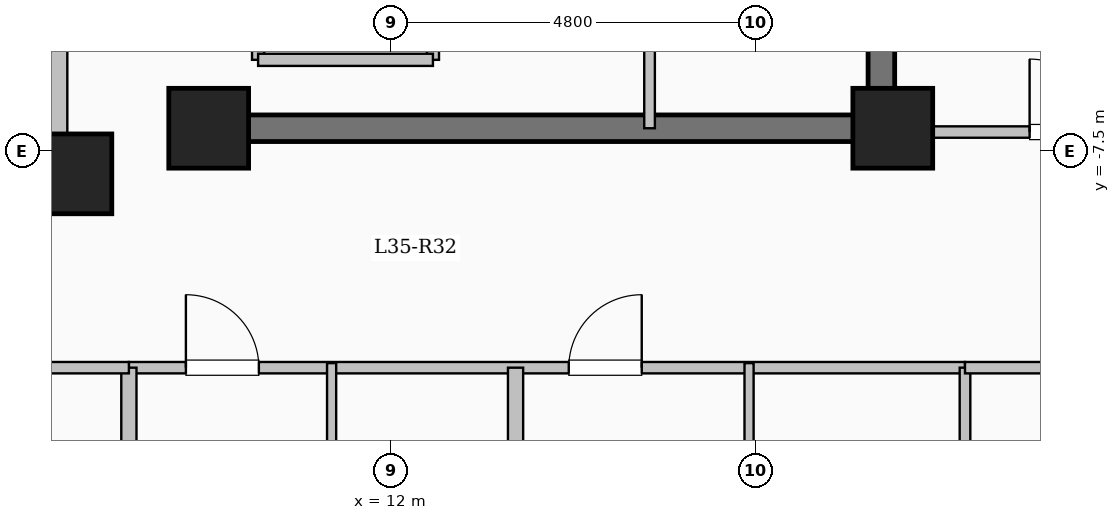
"""IFC4 building model, lengths in metres.
Left out: names, types, materials, properties, quantities, classifications, styles, units other than length and angle.
Written with IfcOpenShell. Run it as: python <this file> out.ifc"""

import sys

from ifc_helpers import new_model, si_unit, direction, frame, frame_2d, origin, origin_2d, place, context, subcontext, project, spatial, rectangle, extrude, element, fill, save


model = new_model("IFC4")
c1 = context("Model", 3, precision=1e-05, world=origin(), true_north=direction((0.0, 1.0)))
c2 = subcontext(c1, "Body", "Model", "MODEL_VIEW")
j1 = project(units=[si_unit("LENGTHUNIT", "METRE"), si_unit("PLANEANGLEUNIT", "RADIAN")], contexts=[c1])
p1 = place(None, origin())
s1 = spatial("IfcSite", under=j1, at=p1, CompositionType="ELEMENT")
p2 = place(p1, origin())
s2 = spatial("IfcBuilding", under=s1, at=p2, CompositionType="ELEMENT")
p3 = place(p2, frame((0.0, 0.0, 132.6)))
s3 = spatial("IfcBuildingStorey", under=s2, at=p3, CompositionType="ELEMENT", Elevation=132.6)
for number, where, z_axis, x_axis in (
    (1, (7.8, -7.8, 0.0), (0.0, 0.0, 1.0), (1.0, 0.0, 0.0)),
    (2, (9.6, -7.2, 0.0), (0.0, 0.0, 1.0), (1.0, 0.0, 0.0)),
    (3, (18.6, -7.2, 0.0), (0.0, 0.0, 1.0), (1.0, 0.0, 0.0)),
):
    element("IfcColumn", number, at=place(p3, frame(where, z_axis=z_axis, x_axis=x_axis)), inside=s3, PredefinedType="COLUMN", context=c2, shape_type="SweptSolid", body=[
        extrude(rectangle(XDim=1.05, YDim=1.05, at=origin_2d()), origin(), (0.0, 0.0, 1.0), 3.35),
    ])
p4 = place(p3, frame((-7.62, -7.62, 0.0), z_axis=(0.0, 0.0, 1.0), x_axis=(1.0, 0.0, 0.0)))
e4 = element("IfcWall", 4, at=p4, inside=s3, PredefinedType="SOLIDWALL", context=c2, shape_type="SweptSolid", body=[
    extrude(rectangle(XDim=15.24, YDim=0.24, at=frame_2d((7.62, 0.0))), origin(), (0.0, 0.0, 1.0), 3.1),
])
p5 = place(p4, frame((6.92, 0.0, 0.95)))
e5 = element("IfcOpeningElement", 5, at=p5, cuts=e4, PredefinedType="OPENING", context=c2, shape_type="SweptSolid", body=[
    extrude(rectangle(XDim=1.4, YDim=1.5, at=frame_2d((0.7, 0.75))), frame((0.0, 0.13, 0.0), z_axis=(0.0, -1.0, 0.0), x_axis=(1.0, 0.0, 0.0)), (0.0, 0.0, 1.0), 0.26),
])
p6 = place(p3, frame((7.62, -7.62, 0.0), z_axis=(0.0, 0.0, 1.0), x_axis=(0.0, 1.0, 0.0)))
e6 = element("IfcWall", 6, at=p6, inside=s3, PredefinedType="SOLIDWALL", context=c2, shape_type="SweptSolid", body=[
    extrude(rectangle(XDim=15.24, YDim=0.24, at=frame_2d((7.62, 0.0))), origin(), (0.0, 0.0, 1.0), 3.1),
])
p7 = place(p6, frame((6.92, 0.0, 0.95)))
e7 = element("IfcOpeningElement", 7, at=p7, cuts=e6, PredefinedType="OPENING", context=c2, shape_type="SweptSolid", body=[
    extrude(rectangle(XDim=1.4, YDim=1.5, at=frame_2d((0.7, 0.75))), frame((0.0, 0.13, 0.0), z_axis=(0.0, -1.0, 0.0), x_axis=(1.0, 0.0, 0.0)), (0.0, 0.0, 1.0), 0.26),
])
p8 = place(p3, frame((10.25, -6.3, 0.0), z_axis=(0.0, 0.0, 1.0), x_axis=(0.0, 1.0, 0.0)))
e8 = element("IfcWall", 8, at=p8, inside=s3, PredefinedType="SOLIDWALL", context=c2, shape_type="SweptSolid", body=[
    extrude(rectangle(XDim=2.6, YDim=0.16, at=frame_2d((1.3, 0.0))), origin(), (0.0, 0.0, 1.0), 3.1),
])
p9 = place(p8, frame((0.75, 0.0, 0.0)))
e9 = element("IfcOpeningElement", 9, at=p9, cuts=e8, PredefinedType="OPENING", context=c2, shape_type="SweptSolid", body=[
    extrude(rectangle(XDim=1.1, YDim=2.15, at=frame_2d((0.55, 1.075))), frame((0.0, 0.09, 0.0), z_axis=(0.0, -1.0, 0.0), x_axis=(1.0, 0.0, 0.0)), (0.0, 0.0, 1.0), 0.18),
])
p10 = place(p3, frame((12.55, -6.3, 0.0), z_axis=(0.0, 0.0, 1.0), x_axis=(0.0, 1.0, 0.0)))
e10 = element("IfcWall", 10, at=p10, inside=s3, PredefinedType="SOLIDWALL", context=c2, shape_type="SweptSolid", body=[
    extrude(rectangle(XDim=2.6, YDim=0.16, at=frame_2d((1.3, 0.0))), origin(), (0.0, 0.0, 1.0), 3.1),
])
p11 = place(p3, frame((10.25, -6.3, 0.0), z_axis=(0.0, 0.0, 1.0), x_axis=(1.0, 0.0, 0.0)))
e11 = element("IfcWall", 11, at=p11, inside=s3, PredefinedType="SOLIDWALL", context=c2, shape_type="SweptSolid", body=[
    extrude(rectangle(XDim=2.3, YDim=0.16, at=frame_2d((1.15, 0.0))), origin(), (0.0, 0.0, 1.0), 3.1),
])
p12 = place(p3, frame((18.45, -7.375, 0.0), z_axis=(0.0, 0.0, 1.0), x_axis=(0.0, 1.0, 0.0)))
e12 = element("IfcWall", 12, at=p12, inside=s3, PredefinedType="SHEAR", context=c2, shape_type="SweptSolid", body=[
    extrude(rectangle(XDim=14.05, YDim=0.35, at=frame_2d((7.025, 0.0))), origin(), (0.0, 0.0, 1.0), 3.35),
])
p13 = place(p3, frame((10.075, -7.2, 0.0), z_axis=(0.0, 0.0, 1.0), x_axis=(1.0, 0.0, 0.0)))
e13 = element("IfcWall", 13, at=p13, inside=s3, PredefinedType="SHEAR", context=c2, shape_type="SweptSolid", body=[
    extrude(rectangle(XDim=8.55, YDim=0.35, at=frame_2d((4.275, 0.0))), origin(), (0.0, 0.0, 1.0), 3.35),
])
p14 = place(p3, frame((15.4, -7.2, 0.0), z_axis=(0.0, 0.0, 1.0), x_axis=(0.0, 1.0, 0.0)))
e14 = element("IfcWall", 14, at=p14, inside=s3, PredefinedType="PARTITIONING", context=c2, shape_type="SweptSolid", body=[
    extrude(rectangle(XDim=10.45, YDim=0.14, at=frame_2d((5.225, 0.0))), origin(), (0.0, 0.0, 1.0), 3.1),
])
p15 = place(p14, frame((9.25, 0.0, 0.0)))
e15 = element("IfcOpeningElement", 15, at=p15, cuts=e14, PredefinedType="OPENING", context=c2, shape_type="SweptSolid", body=[
    extrude(rectangle(XDim=0.9, YDim=2.08, at=frame_2d((0.45, 1.04))), frame((0.0, 0.08, 0.0), z_axis=(0.0, -1.0, 0.0), x_axis=(1.0, 0.0, 0.0)), (0.0, 0.0, 1.0), 0.16),
])
p16 = place(p3, frame((8.55, -10.35, 0.0), z_axis=(0.0, 0.0, 1.0), x_axis=(1.0, 0.0, 0.0)))
e16 = element("IfcWall", 16, at=p16, inside=s3, PredefinedType="PARTITIONING", context=c2, shape_type="SweptSolid", body=[
    extrude(rectangle(XDim=11.0, YDim=0.15, at=frame_2d((5.5, 0.0))), origin(), (0.0, 0.0, 1.0), 3.1),
])
p17 = place(p16, frame((0.75, 0.0, 0.0)))
e17 = element("IfcOpeningElement", 17, at=p17, cuts=e16, PredefinedType="OPENING", context=c2, shape_type="SweptSolid", body=[
    extrude(rectangle(XDim=0.96, YDim=2.15, at=frame_2d((0.48, 1.075))), frame((0.0, 0.085, 0.0), z_axis=(0.0, -1.0, 0.0), x_axis=(1.0, 0.0, 0.0)), (0.0, 0.0, 1.0), 0.17),
])
p18 = place(p16, frame((5.787, 0.0, 0.0)))
e18 = element("IfcOpeningElement", 18, at=p18, cuts=e16, PredefinedType="OPENING", context=c2, shape_type="SweptSolid", body=[
    extrude(rectangle(XDim=0.96, YDim=2.15, at=frame_2d((0.48, 1.075))), frame((0.0, 0.085, 0.0), z_axis=(0.0, -1.0, 0.0), x_axis=(1.0, 0.0, 0.0)), (0.0, 0.0, 1.0), 0.17),
])
p19 = place(p3, frame((13.637, -21.2, 0.0), z_axis=(0.0, 0.0, 1.0), x_axis=(0.0, 1.0, 0.0)))
e19 = element("IfcWall", 19, at=p19, inside=s3, PredefinedType="SOLIDWALL", context=c2, shape_type="SweptSolid", body=[
    extrude(rectangle(XDim=10.85, YDim=0.2, at=frame_2d((5.425, 0.0))), origin(), (0.0, 0.0, 1.0), 3.1),
])
p20 = place(p3, frame((11.217, -13.51, 0.0), z_axis=(0.0, 0.0, 1.0), x_axis=(0.0, 1.0, 0.0)))
e20 = element("IfcWall", 20, at=p20, inside=s3, PredefinedType="PARTITIONING", context=c2, shape_type="SweptSolid", body=[
    extrude(rectangle(XDim=3.22, YDim=0.12, at=frame_2d((1.61, 0.0))), origin(), (0.0, 0.0, 1.0), 3.1),
])
p21 = place(p20, frame((1.14, 0.0, 0.0)))
e21 = element("IfcOpeningElement", 21, at=p21, cuts=e20, PredefinedType="OPENING", context=c2, shape_type="SweptSolid", body=[
    extrude(rectangle(XDim=0.88, YDim=2.1, at=frame_2d((0.44, 1.05))), frame((0.0, 0.07, 0.0), z_axis=(0.0, -1.0, 0.0), x_axis=(1.0, 0.0, 0.0)), (0.0, 0.0, 1.0), 0.14),
])
p22 = place(p3, frame((16.709, -13.51, 0.0), z_axis=(0.0, 0.0, 1.0), x_axis=(0.0, 1.0, 0.0)))
e22 = element("IfcWall", 22, at=p22, inside=s3, PredefinedType="PARTITIONING", context=c2, shape_type="SweptSolid", body=[
    extrude(rectangle(XDim=3.22, YDim=0.12, at=frame_2d((1.61, 0.0))), origin(), (0.0, 0.0, 1.0), 3.1),
])
p23 = place(p22, frame((1.14, 0.0, 0.0)))
e23 = element("IfcOpeningElement", 23, at=p23, cuts=e22, PredefinedType="OPENING", context=c2, shape_type="SweptSolid", body=[
    extrude(rectangle(XDim=0.88, YDim=2.1, at=frame_2d((0.44, 1.05))), frame((0.0, 0.07, 0.0), z_axis=(0.0, -1.0, 0.0), x_axis=(1.0, 0.0, 0.0)), (0.0, 0.0, 1.0), 0.14),
])
p24 = place(p3, frame((8.55, -21.804, 0.0), z_axis=(0.0, 0.0, 1.0), x_axis=(0.0, 1.0, 0.0)))
e24 = element("IfcWall", 24, at=p24, inside=s3, PredefinedType="SOLIDWALL", context=c2, shape_type="SweptSolid", body=[
    extrude(rectangle(XDim=11.454, YDim=0.2, at=frame_2d((5.727, 0.0))), origin(), (0.0, 0.0, 1.0), 3.1),
])
p25 = place(p3, frame((-8.55, -10.35, 0.0), z_axis=(0.0, 0.0, 1.0), x_axis=(1.0, 0.0, 0.0)))
e25 = element("IfcWall", 25, at=p25, inside=s3, PredefinedType="PARTITIONING", context=c2, shape_type="SweptSolid", body=[
    extrude(rectangle(XDim=17.1, YDim=0.15, at=frame_2d((8.55, 0.0))), origin(), (0.0, 0.0, 1.0), 3.1),
])
p26 = place(p25, frame((1.15, 0.0, 0.0)))
e26 = element("IfcOpeningElement", 26, at=p26, cuts=e25, PredefinedType="OPENING", context=c2, shape_type="SweptSolid", body=[
    extrude(rectangle(XDim=0.96, YDim=2.15, at=frame_2d((0.48, 1.075))), frame((0.0, 0.085, 0.0), z_axis=(0.0, -1.0, 0.0), x_axis=(1.0, 0.0, 0.0)), (0.0, 0.0, 1.0), 0.17),
])
p27 = place(p25, frame((10.5, 0.0, 0.0)))
e27 = element("IfcOpeningElement", 27, at=p27, cuts=e25, PredefinedType="OPENING", context=c2, shape_type="SweptSolid", body=[
    extrude(rectangle(XDim=0.96, YDim=2.15, at=frame_2d((0.48, 1.075))), frame((0.0, 0.085, 0.0), z_axis=(0.0, -1.0, 0.0), x_axis=(1.0, 0.0, 0.0)), (0.0, 0.0, 1.0), 0.17),
])
p28 = place(p3, frame((18.45, -7.25, 0.0), z_axis=(0.0, 0.0, 1.0), x_axis=(1.0, 0.0, 0.0)))
e28 = element("IfcWall", 28, at=p28, inside=s3, PredefinedType="PARTITIONING", context=c2, shape_type="SweptSolid", body=[
    extrude(rectangle(XDim=6.63, YDim=0.15, at=frame_2d((3.315, 0.0))), origin(), (0.0, 0.0, 1.0), 3.1),
])
p29 = place(p28, frame((1.95, 0.0, 0.0)))
e29 = element("IfcOpeningElement", 29, at=p29, cuts=e28, PredefinedType="OPENING", context=c2, shape_type="SweptSolid", body=[
    extrude(rectangle(XDim=0.96, YDim=2.15, at=frame_2d((0.48, 1.075))), frame((0.0, 0.085, 0.0), z_axis=(0.0, -1.0, 0.0), x_axis=(1.0, 0.0, 0.0)), (0.0, 0.0, 1.0), 0.17),
])
p30 = place(p3, frame((19.55, -17.25, 0.0), z_axis=(0.0, 0.0, 1.0), x_axis=(0.0, 1.0, 0.0)))
e30 = element("IfcWall", 30, at=p30, inside=s3, PredefinedType="PARTITIONING", context=c2, shape_type="SweptSolid", body=[
    extrude(rectangle(XDim=6.9, YDim=0.14, at=frame_2d((3.45, 0.0))), origin(), (0.0, 0.0, 1.0), 3.1),
])
p31 = place(p3, frame((19.55, -10.35, 0.0), z_axis=(0.0, 0.0, 1.0), x_axis=(1.0, 0.0, 0.0)))
e31 = element("IfcWall", 31, at=p31, inside=s3, PredefinedType="PARTITIONING", context=c2, shape_type="SweptSolid", body=[
    extrude(rectangle(XDim=5.53, YDim=0.15, at=frame_2d((2.765, 0.0))), origin(), (0.0, 0.0, 1.0), 3.1),
])
p32 = place(p31, frame((2.29, 0.0, 0.0)))
e32 = element("IfcOpeningElement", 32, at=p32, cuts=e31, PredefinedType="OPENING", context=c2, shape_type="SweptSolid", body=[
    extrude(rectangle(XDim=0.95, YDim=2.15, at=frame_2d((0.475, 1.075))), frame((0.0, 0.085, 0.0), z_axis=(0.0, -1.0, 0.0), x_axis=(1.0, 0.0, 0.0)), (0.0, 0.0, 1.0), 0.17),
])
p33 = place(p17, origin())
e33 = element("IfcDoor", 33, at=p33, inside=s3, OperationType="SINGLE_SWING_LEFT", PredefinedType="DOOR", context=c2, shape_type="SweptSolid", body=[
    extrude(rectangle(XDim=0.96, YDim=2.15, at=frame_2d((0.48, 1.075))), frame((0.0, 0.025, 0.0), z_axis=(0.0, -1.0, 0.0), x_axis=(1.0, 0.0, 0.0)), (0.0, 0.0, 1.0), 0.05),
])
fill(e17, e33)
p34 = place(p18, origin())
e34 = element("IfcDoor", 34, at=p34, inside=s3, OperationType="SINGLE_SWING_RIGHT", PredefinedType="DOOR", context=c2, shape_type="SweptSolid", body=[
    extrude(rectangle(XDim=0.96, YDim=2.15, at=frame_2d((0.48, 1.075))), frame((0.0, 0.025, 0.0), z_axis=(0.0, -1.0, 0.0), x_axis=(1.0, 0.0, 0.0)), (0.0, 0.0, 1.0), 0.05),
])
fill(e18, e34)
p35 = place(p29, origin())
e35 = element("IfcDoor", 35, at=p35, inside=s3, OperationType="SINGLE_SWING_LEFT", PredefinedType="DOOR", context=c2, shape_type="SweptSolid", body=[
    extrude(rectangle(XDim=0.96, YDim=2.15, at=frame_2d((0.48, 1.075))), frame((0.0, 0.025, 0.0), z_axis=(0.0, -1.0, 0.0), x_axis=(1.0, 0.0, 0.0)), (0.0, 0.0, 1.0), 0.05),
])
fill(e29, e35)
save(model, sys.argv[1])
